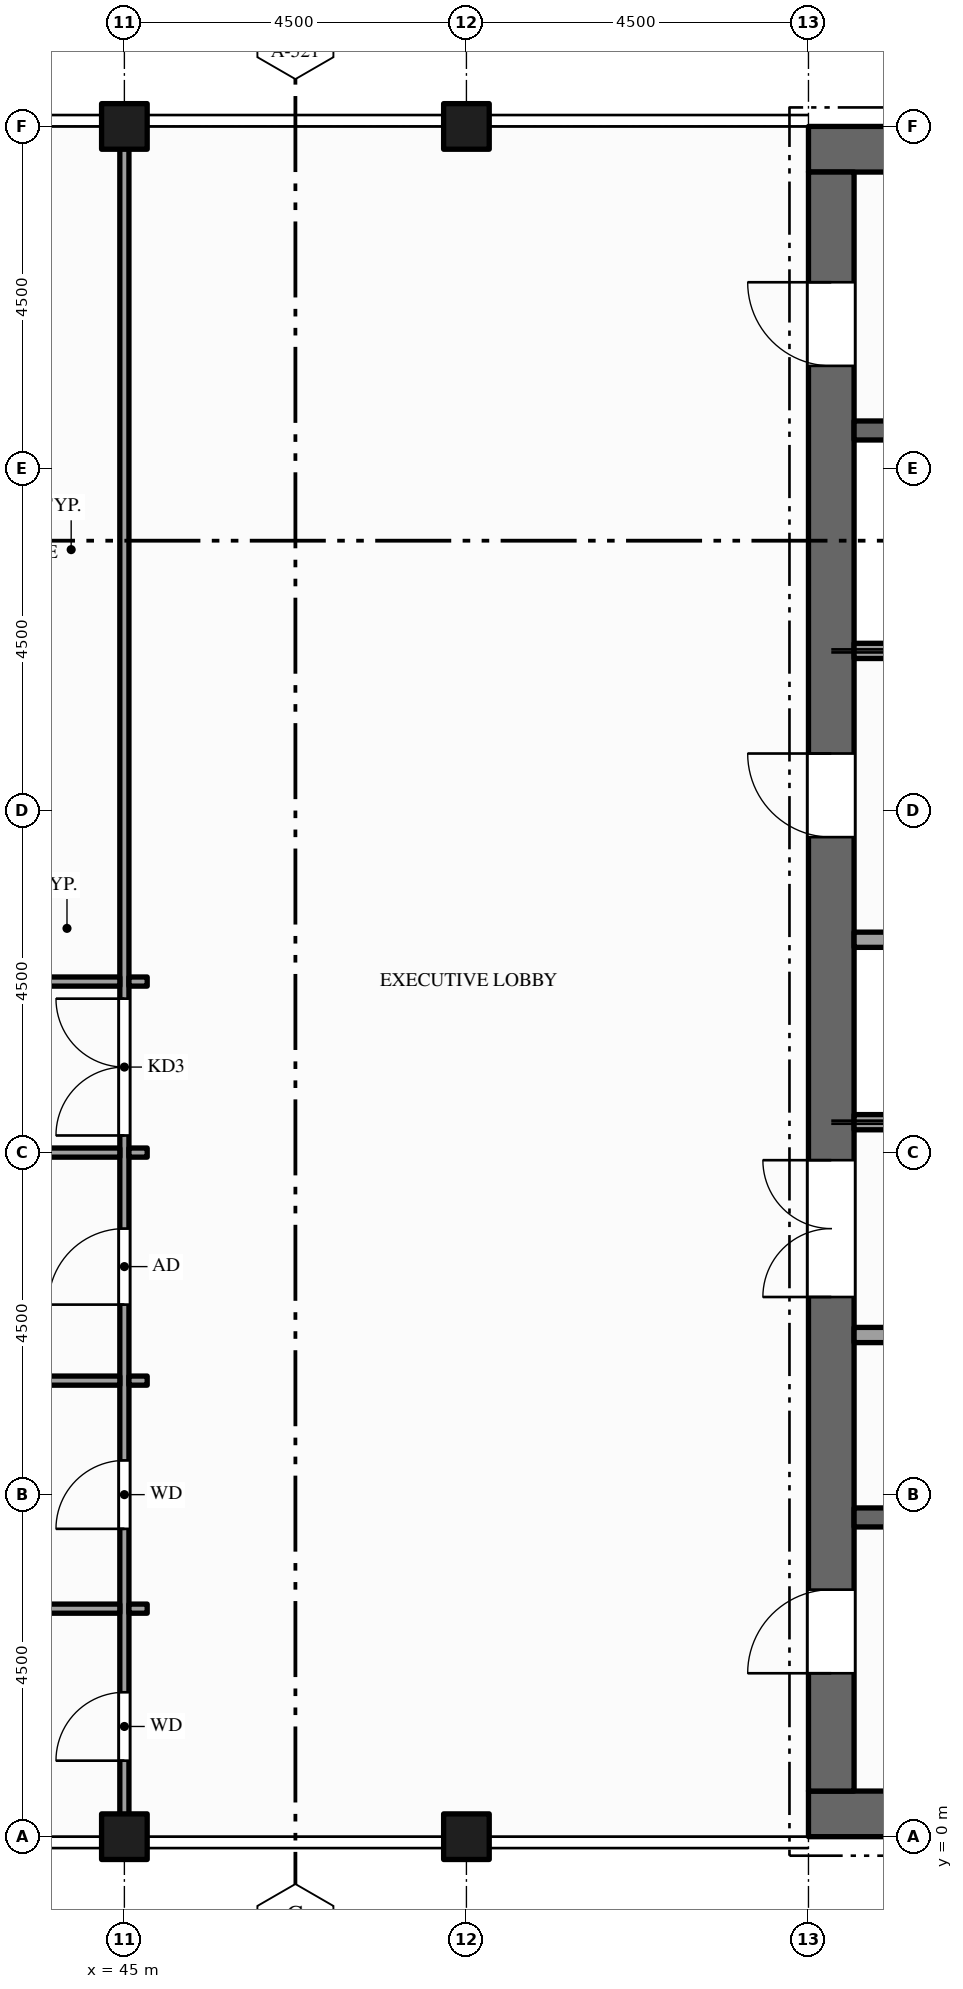
"""IFC4 building model, lengths in metres.
Left out: names, types, materials, properties, quantities, classifications, styles, units other than length and angle.
Written with IfcOpenShell. Run it as: python <this file> out.ifc"""

import sys

from ifc_helpers import new_model, si_unit, direction, frame, frame_2d, origin, origin_2d, place, context, subcontext, project, spatial, rectangle, hollow_rectangle, extrude, element, fill, save


model = new_model("IFC4")
c1 = context("Model", 3, precision=1e-05, world=origin(), true_north=direction((0.0, 1.0)))
c2 = subcontext(c1, "Body", "Model", "MODEL_VIEW")
j1 = project(units=[si_unit("LENGTHUNIT", "METRE"), si_unit("PLANEANGLEUNIT", "RADIAN")], contexts=[c1])
p1 = place(None, origin())
s1 = spatial("IfcSite", under=j1, at=p1, CompositionType="ELEMENT")
p2 = place(p1, origin())
s2 = spatial("IfcBuilding", under=s1, at=p2, CompositionType="ELEMENT")
p3 = place(p2, frame((0.0, 0.0, 314.0)))
s3 = spatial("IfcBuildingStorey", under=s2, at=p3, CompositionType="ELEMENT", Elevation=314.0)
for number, where, z_axis, x_axis in (
    (1, (67.5, 0.3, -0.15), (0.0, 0.0, 1.0), (-1.0, 0.0, 0.0)),
    (2, (54.0, 22.2, -0.15), (0.0, 0.0, 1.0), (1.0, 0.0, 0.0)),
):
    element("IfcWall", number, at=place(p3, frame(where, z_axis=z_axis, x_axis=x_axis)), inside=s3, PredefinedType="SHEAR", context=c2, shape_type="SweptSolid", body=[
        extrude(rectangle(XDim=13.5, YDim=0.6, at=frame_2d((6.75, 0.0))), origin(), (0.0, 0.0, 1.0), 4.5),
    ])
p4 = place(p3, frame((54.3, 0.6, -0.15), z_axis=(0.0, 0.0, 1.0), x_axis=(0.0, 1.0, 0.0)))
e3 = element("IfcWall", 3, at=p4, inside=s3, PredefinedType="SHEAR", context=c2, shape_type="SweptSolid", body=[
    extrude(rectangle(XDim=21.3, YDim=0.6, at=frame_2d((10.65, 0.0))), origin(), (0.0, 0.0, 1.0), 4.5),
])
p5 = place(p4, frame((6.5, 0.0, 0.15)))
e4 = element("IfcOpeningElement", 4, at=p5, cuts=e3, PredefinedType="OPENING", context=c2, shape_type="SweptSolid", body=[
    extrude(rectangle(XDim=1.8, YDim=2.1, at=frame_2d((0.9, 1.05))), frame((0.0, 0.31, 0.0), z_axis=(0.0, -1.0, 0.0), x_axis=(1.0, 0.0, 0.0)), (0.0, 0.0, 1.0), 0.62),
])
p6 = place(p4, frame((12.55, 0.0, 0.15)))
e5 = element("IfcOpeningElement", 5, at=p6, cuts=e3, PredefinedType="OPENING", context=c2, shape_type="SweptSolid", body=[
    extrude(rectangle(XDim=1.1, YDim=2.1, at=frame_2d((0.55, 1.05))), frame((0.0, 0.31, 0.0), z_axis=(0.0, -1.0, 0.0), x_axis=(1.0, 0.0, 0.0)), (0.0, 0.0, 1.0), 0.62),
])
p7 = place(p4, frame((1.55, 0.0, 0.15)))
e6 = element("IfcOpeningElement", 6, at=p7, cuts=e3, PredefinedType="OPENING", context=c2, shape_type="SweptSolid", body=[
    extrude(rectangle(XDim=1.1, YDim=2.1, at=frame_2d((0.55, 1.05))), frame((0.0, 0.31, 0.0), z_axis=(0.0, -1.0, 0.0), x_axis=(1.0, 0.0, 0.0)), (0.0, 0.0, 1.0), 0.62),
])
p8 = place(p4, frame((18.75, 0.0, 0.15)))
e7 = element("IfcOpeningElement", 7, at=p8, cuts=e3, PredefinedType="OPENING", context=c2, shape_type="SweptSolid", body=[
    extrude(rectangle(XDim=1.1, YDim=2.1, at=frame_2d((0.55, 1.05))), frame((0.0, 0.31, 0.0), z_axis=(0.0, -1.0, 0.0), x_axis=(1.0, 0.0, 0.0)), (0.0, 0.0, 1.0), 0.62),
])
for number, where, z_axis, x_axis in (
    (8, (45.0, 0.0, -0.15), (0.0, 0.0, 1.0), (1.0, 0.0, 0.0)),
    (9, (45.0, 22.5, -0.15), (0.0, 0.0, 1.0), (1.0, 0.0, 0.0)),
    (10, (49.5, 0.0, -0.15), (0.0, 0.0, 1.0), (1.0, 0.0, 0.0)),
    (11, (49.5, 22.5, -0.15), (0.0, 0.0, 1.0), (1.0, 0.0, 0.0)),
):
    element("IfcColumn", number, at=place(p3, frame(where, z_axis=z_axis, x_axis=x_axis)), inside=s3, PredefinedType="COLUMN", context=c2, shape_type="SweptSolid", body=[
        extrude(hollow_rectangle(XDim=0.6, YDim=0.6, WallThickness=0.03, at=origin_2d()), origin(), (0.0, 0.0, 1.0), 4.5),
    ])
p9 = place(p3, frame((45.0, 0.01, 0.0), z_axis=(0.0, 0.0, 1.0), x_axis=(0.0, 1.0, 0.0)))
e12 = element("IfcWall", 12, at=p9, inside=s3, PredefinedType="PARTITIONING", context=c2, shape_type="SweptSolid", body=[
    extrude(rectangle(XDim=22.48, YDim=0.12, at=frame_2d((11.24, 0.0))), origin(), (0.0, 0.0, 1.0), 3.359),
])
p10 = place(p9, frame((9.215, 0.0, 0.0)))
e13 = element("IfcOpeningElement", 13, at=p10, cuts=e12, PredefinedType="OPENING", context=c2, shape_type="SweptSolid", body=[
    extrude(rectangle(XDim=1.8, YDim=2.1, at=frame_2d((0.9, 1.05))), frame((0.0, 0.07, 0.0), z_axis=(0.0, -1.0, 0.0), x_axis=(1.0, 0.0, 0.0)), (0.0, 0.0, 1.0), 0.14),
])
p11 = place(p9, frame((0.99, 0.0, 0.0)))
e14 = element("IfcOpeningElement", 14, at=p11, cuts=e12, PredefinedType="OPENING", context=c2, shape_type="SweptSolid", body=[
    extrude(rectangle(XDim=0.9, YDim=2.1, at=frame_2d((0.45, 1.05))), frame((0.0, 0.07, 0.0), z_axis=(0.0, -1.0, 0.0), x_axis=(1.0, 0.0, 0.0)), (0.0, 0.0, 1.0), 0.14),
])
p12 = place(p9, frame((4.04, 0.0, 0.0)))
e15 = element("IfcOpeningElement", 15, at=p12, cuts=e12, PredefinedType="OPENING", context=c2, shape_type="SweptSolid", body=[
    extrude(rectangle(XDim=0.9, YDim=2.1, at=frame_2d((0.45, 1.05))), frame((0.0, 0.07, 0.0), z_axis=(0.0, -1.0, 0.0), x_axis=(1.0, 0.0, 0.0)), (0.0, 0.0, 1.0), 0.14),
])
p13 = place(p9, frame((6.99, 0.0, 0.0)))
e16 = element("IfcOpeningElement", 16, at=p13, cuts=e12, PredefinedType="OPENING", context=c2, shape_type="SweptSolid", body=[
    extrude(rectangle(XDim=1.0, YDim=2.1, at=frame_2d((0.5, 1.05))), frame((0.0, 0.07, 0.0), z_axis=(0.0, -1.0, 0.0), x_axis=(1.0, 0.0, 0.0)), (0.0, 0.0, 1.0), 0.14),
])
p14 = place(p3, frame((40.56, 3.0, 0.0), z_axis=(0.0, 0.0, 1.0), x_axis=(1.0, 0.0, 0.0)))
e17 = element("IfcWall", 17, at=p14, inside=s3, PredefinedType="PARTITIONING", context=c2, shape_type="SweptSolid", body=[
    extrude(rectangle(XDim=4.38, YDim=0.12, at=frame_2d((2.19, 0.0))), origin(), (0.0, 0.0, 1.0), 3.359),
])
p15 = place(p3, frame((45.06, 3.0, 0.0), z_axis=(0.0, 0.0, 1.0), x_axis=(1.0, 0.0, 0.0)))
e18 = element("IfcWall", 18, at=p15, inside=s3, PredefinedType="PARTITIONING", context=c2, shape_type="SweptSolid", body=[
    extrude(rectangle(XDim=0.24, YDim=0.12, at=frame_2d((0.12, 0.0))), origin(), (0.0, 0.0, 1.0), 3.359),
])
p16 = place(p3, frame((54.6, 4.2, 0.0), z_axis=(0.0, 0.0, 1.0), x_axis=(1.0, 0.0, 0.0)))
e19 = element("IfcWall", 19, at=p16, inside=s3, PredefinedType="SHEAR", context=c2, shape_type="SweptSolid", body=[
    extrude(rectangle(XDim=6.675, YDim=0.25, at=frame_2d((3.337, 0.0))), origin(), (0.0, 0.0, 1.0), 4.35),
])
p17 = place(p3, frame((40.56, 6.0, 0.0), z_axis=(0.0, 0.0, 1.0), x_axis=(1.0, 0.0, 0.0)))
e20 = element("IfcWall", 20, at=p17, inside=s3, PredefinedType="PARTITIONING", context=c2, shape_type="SweptSolid", body=[
    extrude(rectangle(XDim=4.38, YDim=0.12, at=frame_2d((2.19, 0.0))), origin(), (0.0, 0.0, 1.0), 3.359),
])
p18 = place(p3, frame((45.06, 6.0, 0.0), z_axis=(0.0, 0.0, 1.0), x_axis=(1.0, 0.0, 0.0)))
e21 = element("IfcWall", 21, at=p18, inside=s3, PredefinedType="PARTITIONING", context=c2, shape_type="SweptSolid", body=[
    extrude(rectangle(XDim=0.24, YDim=0.12, at=frame_2d((0.12, 0.0))), origin(), (0.0, 0.0, 1.0), 3.359),
])
p19 = place(p3, frame((54.6, 6.6, 0.0), z_axis=(0.0, 0.0, 1.0), x_axis=(1.0, 0.0, 0.0)))
e22 = element("IfcWall", 22, at=p19, inside=s3, PredefinedType="PARTITIONING", context=c2, shape_type="SweptSolid", body=[
    extrude(rectangle(XDim=2.7, YDim=0.2, at=frame_2d((1.35, 0.0))), origin(), (0.0, 0.0, 1.0), 4.35),
])
p20 = place(p19, frame((0.9, 0.0, 0.0)))
e23 = element("IfcOpeningElement", 23, at=p20, cuts=e22, PredefinedType="OPENING", context=c2, shape_type="SweptSolid", body=[
    extrude(rectangle(XDim=0.9, YDim=2.1, at=frame_2d((0.45, 1.05))), frame((0.0, 0.11, 0.0), z_axis=(0.0, -1.0, 0.0), x_axis=(1.0, 0.0, 0.0)), (0.0, 0.0, 1.0), 0.22),
])
p21 = place(p3, frame((40.56, 9.0, 0.0), z_axis=(0.0, 0.0, 1.0), x_axis=(1.0, 0.0, 0.0)))
e24 = element("IfcWall", 24, at=p21, inside=s3, PredefinedType="PARTITIONING", context=c2, shape_type="SweptSolid", body=[
    extrude(rectangle(XDim=4.38, YDim=0.12, at=frame_2d((2.19, 0.0))), origin(), (0.0, 0.0, 1.0), 3.359),
])
p22 = place(p3, frame((45.06, 9.0, 0.0), z_axis=(0.0, 0.0, 1.0), x_axis=(1.0, 0.0, 0.0)))
e25 = element("IfcWall", 25, at=p22, inside=s3, PredefinedType="PARTITIONING", context=c2, shape_type="SweptSolid", body=[
    extrude(rectangle(XDim=0.24, YDim=0.12, at=frame_2d((0.12, 0.0))), origin(), (0.0, 0.0, 1.0), 3.359),
])
p23 = place(p3, frame((54.6, 9.4, 0.0), z_axis=(0.0, 0.0, 1.0), x_axis=(1.0, 0.0, 0.0)))
e26 = element("IfcWall", 26, at=p23, inside=s3, PredefinedType="SOLIDWALL", context=c2, shape_type="SweptSolid", body=[
    extrude(rectangle(XDim=2.7, YDim=0.2, at=frame_2d((1.35, 0.0))), origin(), (0.0, 0.0, 1.0), 4.35),
])
p24 = place(p23, frame((0.8, 0.0, 0.012)))
e27 = element("IfcOpeningElement", 27, at=p24, cuts=e26, PredefinedType="OPENING", context=c2, shape_type="SweptSolid", body=[
    extrude(rectangle(XDim=1.1, YDim=2.1, at=frame_2d((0.55, 1.05))), frame((0.0, 0.11, 0.0), z_axis=(0.0, -1.0, 0.0), x_axis=(1.0, 0.0, 0.0)), (0.0, 0.0, 1.0), 0.22),
])
p25 = place(p3, frame((40.56, 11.25, 0.0), z_axis=(0.0, 0.0, 1.0), x_axis=(1.0, 0.0, 0.0)))
e28 = element("IfcWall", 28, at=p25, inside=s3, PredefinedType="PARTITIONING", context=c2, shape_type="SweptSolid", body=[
    extrude(rectangle(XDim=4.38, YDim=0.12, at=frame_2d((2.19, 0.0))), origin(), (0.0, 0.0, 1.0), 3.359),
])
p26 = place(p25, frame((1.74, 0.0, 0.0)))
e29 = element("IfcOpeningElement", 29, at=p26, cuts=e28, PredefinedType="OPENING", context=c2, shape_type="SweptSolid", body=[
    extrude(rectangle(XDim=0.9, YDim=2.1, at=frame_2d((0.45, 1.05))), frame((0.0, 0.07, 0.0), z_axis=(0.0, -1.0, 0.0), x_axis=(1.0, 0.0, 0.0)), (0.0, 0.0, 1.0), 0.14),
])
p27 = place(p3, frame((45.06, 11.25, 0.0), z_axis=(0.0, 0.0, 1.0), x_axis=(1.0, 0.0, 0.0)))
e30 = element("IfcWall", 30, at=p27, inside=s3, PredefinedType="PARTITIONING", context=c2, shape_type="SweptSolid", body=[
    extrude(rectangle(XDim=0.24, YDim=0.12, at=frame_2d((0.12, 0.0))), origin(), (0.0, 0.0, 1.0), 3.359),
])
p28 = place(p3, frame((54.6, 11.8, 0.0), z_axis=(0.0, 0.0, 1.0), x_axis=(1.0, 0.0, 0.0)))
e31 = element("IfcWall", 31, at=p28, inside=s3, PredefinedType="SOLIDWALL", context=c2, shape_type="SweptSolid", body=[
    extrude(rectangle(XDim=2.7, YDim=0.2, at=frame_2d((1.35, 0.0))), origin(), (0.0, 0.0, 1.0), 4.35),
])
p29 = place(p3, frame((54.6, 15.6, 0.0), z_axis=(0.0, 0.0, 1.0), x_axis=(1.0, 0.0, 0.0)))
e32 = element("IfcWall", 32, at=p29, inside=s3, PredefinedType="SOLIDWALL", context=c2, shape_type="SweptSolid", body=[
    extrude(rectangle(XDim=2.7, YDim=0.2, at=frame_2d((1.35, 0.0))), origin(), (0.0, 0.0, 1.0), 4.35),
])
p30 = place(p29, frame((0.8, 0.0, 0.012)))
e33 = element("IfcOpeningElement", 33, at=p30, cuts=e32, PredefinedType="OPENING", context=c2, shape_type="SweptSolid", body=[
    extrude(rectangle(XDim=1.1, YDim=2.1, at=frame_2d((0.55, 1.05))), frame((0.0, 0.11, 0.0), z_axis=(0.0, -1.0, 0.0), x_axis=(1.0, 0.0, 0.0)), (0.0, 0.0, 1.0), 0.22),
])
p31 = place(p3, frame((54.6, 18.5, 0.0), z_axis=(0.0, 0.0, 1.0), x_axis=(1.0, 0.0, 0.0)))
e34 = element("IfcWall", 34, at=p31, inside=s3, PredefinedType="SHEAR", context=c2, shape_type="SweptSolid", body=[
    extrude(rectangle(XDim=6.675, YDim=0.25, at=frame_2d((3.337, 0.0))), origin(), (0.0, 0.0, 1.0), 4.35),
])
p32 = place(p5, origin())
e35 = element("IfcDoor", 35, at=p32, inside=s3, OperationType="DOUBLE_DOOR_SINGLE_SWING", PredefinedType="DOOR", context=c2, shape_type="SweptSolid", body=[
    extrude(rectangle(XDim=1.8, YDim=2.1, at=frame_2d((0.9, 1.05))), frame((0.0, 0.025, 0.0), z_axis=(0.0, -1.0, 0.0), x_axis=(1.0, 0.0, 0.0)), (0.0, 0.0, 1.0), 0.05),
])
fill(e4, e35)
p33 = place(p6, origin())
e36 = element("IfcDoor", 36, at=p33, inside=s3, OperationType="SINGLE_SWING_RIGHT", PredefinedType="DOOR", context=c2, shape_type="SweptSolid", body=[
    extrude(rectangle(XDim=1.1, YDim=2.1, at=frame_2d((0.55, 1.05))), frame((0.0, 0.025, 0.0), z_axis=(0.0, -1.0, 0.0), x_axis=(1.0, 0.0, 0.0)), (0.0, 0.0, 1.0), 0.05),
])
fill(e5, e36)
p34 = place(p7, origin())
e37 = element("IfcDoor", 37, at=p34, inside=s3, OperationType="SINGLE_SWING_LEFT", PredefinedType="DOOR", context=c2, shape_type="SweptSolid", body=[
    extrude(rectangle(XDim=1.1, YDim=2.1, at=frame_2d((0.55, 1.05))), frame((0.0, 0.025, 0.0), z_axis=(0.0, -1.0, 0.0), x_axis=(1.0, 0.0, 0.0)), (0.0, 0.0, 1.0), 0.05),
])
fill(e6, e37)
p35 = place(p8, origin())
e38 = element("IfcDoor", 38, at=p35, inside=s3, OperationType="SINGLE_SWING_RIGHT", PredefinedType="DOOR", context=c2, shape_type="SweptSolid", body=[
    extrude(rectangle(XDim=1.1, YDim=2.1, at=frame_2d((0.55, 1.05))), frame((0.0, 0.025, 0.0), z_axis=(0.0, -1.0, 0.0), x_axis=(1.0, 0.0, 0.0)), (0.0, 0.0, 1.0), 0.05),
])
fill(e7, e38)
p36 = place(p10, origin())
e39 = element("IfcDoor", 39, at=p36, inside=s3, OperationType="DOUBLE_DOOR_SINGLE_SWING", PredefinedType="DOOR", context=c2, shape_type="SweptSolid", body=[
    extrude(rectangle(XDim=1.8, YDim=2.1, at=frame_2d((0.9, 1.05))), frame((0.0, 0.025, 0.0), z_axis=(0.0, -1.0, 0.0), x_axis=(1.0, 0.0, 0.0)), (0.0, 0.0, 1.0), 0.05),
])
fill(e13, e39)
p37 = place(p11, origin())
e40 = element("IfcDoor", 40, at=p37, inside=s3, OperationType="SINGLE_SWING_LEFT", PredefinedType="DOOR", context=c2, shape_type="SweptSolid", body=[
    extrude(rectangle(XDim=0.9, YDim=2.1, at=frame_2d((0.45, 1.05))), frame((0.0, 0.025, 0.0), z_axis=(0.0, -1.0, 0.0), x_axis=(1.0, 0.0, 0.0)), (0.0, 0.0, 1.0), 0.05),
])
fill(e14, e40)
p38 = place(p12, origin())
e41 = element("IfcDoor", 41, at=p38, inside=s3, OperationType="SINGLE_SWING_LEFT", PredefinedType="DOOR", context=c2, shape_type="SweptSolid", body=[
    extrude(rectangle(XDim=0.9, YDim=2.1, at=frame_2d((0.45, 1.05))), frame((0.0, 0.025, 0.0), z_axis=(0.0, -1.0, 0.0), x_axis=(1.0, 0.0, 0.0)), (0.0, 0.0, 1.0), 0.05),
])
fill(e15, e41)
p39 = place(p13, origin())
e42 = element("IfcDoor", 42, at=p39, inside=s3, OperationType="SINGLE_SWING_LEFT", PredefinedType="DOOR", context=c2, shape_type="SweptSolid", body=[
    extrude(rectangle(XDim=1.0, YDim=2.1, at=frame_2d((0.5, 1.05))), frame((0.0, 0.025, 0.0), z_axis=(0.0, -1.0, 0.0), x_axis=(1.0, 0.0, 0.0)), (0.0, 0.0, 1.0), 0.05),
])
fill(e16, e42)
save(model, sys.argv[1])
